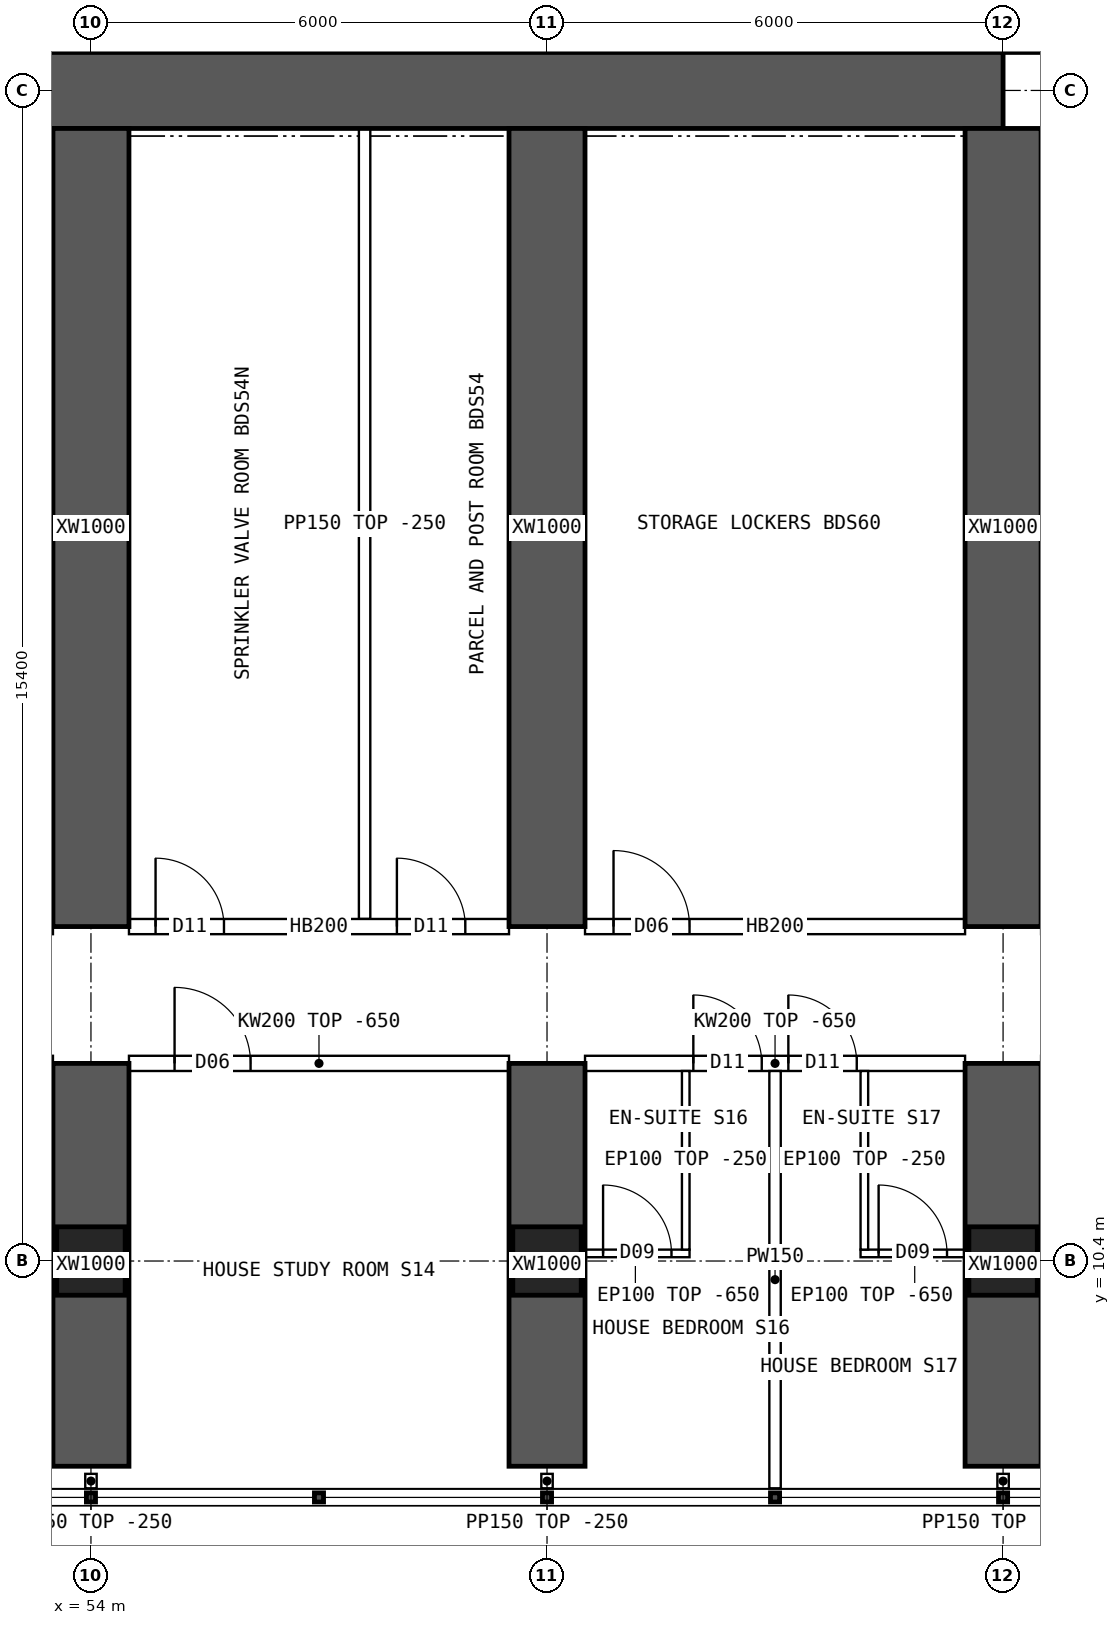
"""IFC4 building model, lengths in metres.
Left out: names, types, materials, properties, quantities, classifications, styles, units other than length and angle.
Written with IfcOpenShell. Run it as: python <this file> out.ifc"""

import sys

from ifc_helpers import new_model, si_unit, direction, frame, frame_2d, origin, origin_2d, place, context, subcontext, project, spatial, polyline, rectangle, hollow_rectangle, outline, extrude, element, fill, save


model = new_model("IFC4")
c1 = context("Model", 3, precision=1e-05, world=origin(), true_north=direction((0.0, 1.0)))
c2 = subcontext(c1, "Body", "Model", "MODEL_VIEW")
j1 = project(units=[si_unit("LENGTHUNIT", "METRE"), si_unit("PLANEANGLEUNIT", "RADIAN")], contexts=[c1])
p1 = place(None, origin())
s1 = spatial("IfcSite", under=j1, at=p1, CompositionType="ELEMENT")
p2 = place(p1, origin())
s2 = spatial("IfcBuilding", under=s1, at=p2, CompositionType="ELEMENT")
p3 = place(p2, frame((0.0, 0.0, 27.7)))
s3 = spatial("IfcBuildingStorey", under=s2, at=p3, CompositionType="ELEMENT", Elevation=27.7)
for number, where, z_axis, x_axis in (
    (1, (54.0, 10.4, 0.0), (0.0, 0.0, 1.0), (1.0, 0.0, 0.0)),
    (2, (60.0, 10.4, 0.0), (0.0, 0.0, 1.0), (1.0, 0.0, 0.0)),
    (3, (66.0, 10.4, 0.0), (0.0, 0.0, 1.0), (1.0, 0.0, 0.0)),
):
    element("IfcColumn", number, at=place(p3, frame(where, z_axis=z_axis, x_axis=x_axis)), inside=s3, PredefinedType="COLUMN", context=c2, shape_type="SweptSolid", body=[
        extrude(hollow_rectangle(XDim=0.9, YDim=0.9, WallThickness=0.09, at=origin_2d()), origin(), (0.0, 0.0, 1.0), 3.75),
    ])
p4 = place(p3, frame((18.0, 25.8, 0.0), z_axis=(0.0, 0.0, 1.0), x_axis=(1.0, 0.0, 0.0)))
e4 = element("IfcWall", 4, at=p4, inside=s3, PredefinedType="SHEAR", context=c2, shape_type="SweptSolid", body=[
    extrude(rectangle(XDim=48.0, YDim=1.0, at=frame_2d((24.0, 0.0))), origin(), (0.0, 0.0, 1.0), 3.75),
])
p5 = place(p3, frame((54.0, 7.7, 0.0), z_axis=(0.0, 0.0, 1.0), x_axis=(0.0, 1.0, 0.0)))
e5 = element("IfcWall", 5, at=p5, inside=s3, PredefinedType="SHEAR", context=c2, shape_type="SweptSolid", body=[
    extrude(rectangle(XDim=5.3, YDim=1.0, at=frame_2d((2.65, 0.0))), origin(), (0.0, 0.0, 1.0), 3.75),
])
p6 = place(p3, frame((54.0, 14.8, 0.0), z_axis=(0.0, 0.0, 1.0), x_axis=(0.0, 1.0, 0.0)))
e6 = element("IfcWall", 6, at=p6, inside=s3, PredefinedType="SHEAR", context=c2, shape_type="SweptSolid", body=[
    extrude(rectangle(XDim=10.5, YDim=1.0, at=frame_2d((5.25, 0.0))), origin(), (0.0, 0.0, 1.0), 3.75),
])
p7 = place(p3, frame((60.0, 7.7, 0.0), z_axis=(0.0, 0.0, 1.0), x_axis=(0.0, 1.0, 0.0)))
e7 = element("IfcWall", 7, at=p7, inside=s3, PredefinedType="SHEAR", context=c2, shape_type="SweptSolid", body=[
    extrude(rectangle(XDim=5.3, YDim=1.0, at=frame_2d((2.65, 0.0))), origin(), (0.0, 0.0, 1.0), 3.75),
])
p8 = place(p3, frame((60.0, 14.8, 0.0), z_axis=(0.0, 0.0, 1.0), x_axis=(0.0, 1.0, 0.0)))
e8 = element("IfcWall", 8, at=p8, inside=s3, PredefinedType="SHEAR", context=c2, shape_type="SweptSolid", body=[
    extrude(rectangle(XDim=10.5, YDim=1.0, at=frame_2d((5.25, 0.0))), origin(), (0.0, 0.0, 1.0), 3.75),
])
p9 = place(p3, frame((66.0, 7.7, 0.0), z_axis=(0.0, 0.0, 1.0), x_axis=(0.0, 1.0, 0.0)))
e9 = element("IfcWall", 9, at=p9, inside=s3, PredefinedType="SHEAR", context=c2, shape_type="SweptSolid", body=[
    extrude(rectangle(XDim=5.3, YDim=1.0, at=frame_2d((2.65, 0.0))), origin(), (0.0, 0.0, 1.0), 3.75),
])
p10 = place(p3, frame((66.0, 14.8, 0.0), z_axis=(0.0, 0.0, 1.0), x_axis=(0.0, 1.0, 0.0)))
e10 = element("IfcWall", 10, at=p10, inside=s3, PredefinedType="SHEAR", context=c2, shape_type="SweptSolid", body=[
    extrude(rectangle(XDim=10.5, YDim=1.0, at=frame_2d((5.25, 0.0))), origin(), (0.0, 0.0, 1.0), 3.75),
])
p11 = place(p3, frame((54.5, 13.0, 0.0), z_axis=(0.0, 0.0, 1.0), x_axis=(1.0, 0.0, 0.0)))
e11 = element("IfcWall", 11, at=p11, inside=s3, PredefinedType="SOLIDWALL", context=c2, shape_type="SweptSolid", body=[
    extrude(outline(polyline([(0.0, 0.0), (5.0, 0.0), (5.0, 3.1), (0.0, 3.1), (0.0, 0.0)])), frame((0.0, 0.1, 0.0), z_axis=(0.0, -1.0, 0.0), x_axis=(1.0, 0.0, 0.0)), (0.0, 0.0, 1.0), 0.2),
])
p12 = place(p11, frame((0.6, 0.0, 0.0)))
e12 = element("IfcOpeningElement", 12, at=p12, cuts=e11, PredefinedType="OPENING", context=c2, shape_type="SweptSolid", body=[
    extrude(rectangle(XDim=1.0, YDim=2.1, at=frame_2d((0.5, 1.05))), frame((0.0, 0.11, 0.0), z_axis=(0.0, -1.0, 0.0), x_axis=(1.0, 0.0, 0.0)), (0.0, 0.0, 1.0), 0.22),
])
p13 = place(p3, frame((54.5, 14.8, 0.0), z_axis=(0.0, 0.0, 1.0), x_axis=(1.0, 0.0, 0.0)))
e13 = element("IfcWall", 13, at=p13, inside=s3, PredefinedType="SOLIDWALL", context=c2, shape_type="SweptSolid", body=[
    extrude(rectangle(XDim=5.0, YDim=0.2, at=frame_2d((2.5, 0.0))), origin(), (0.0, 0.0, 1.0), 3.5),
])
p14 = place(p13, frame((0.35, 0.0, 0.0)))
e14 = element("IfcOpeningElement", 14, at=p14, cuts=e13, PredefinedType="OPENING", context=c2, shape_type="SweptSolid", body=[
    extrude(rectangle(XDim=0.9, YDim=2.1, at=frame_2d((0.45, 1.05))), frame((0.0, 0.11, 0.0), z_axis=(0.0, -1.0, 0.0), x_axis=(1.0, 0.0, 0.0)), (0.0, 0.0, 1.0), 0.22),
])
p15 = place(p13, frame((3.525, 0.0, 0.0)))
e15 = element("IfcOpeningElement", 15, at=p15, cuts=e13, PredefinedType="OPENING", context=c2, shape_type="SweptSolid", body=[
    extrude(rectangle(XDim=0.9, YDim=2.1, at=frame_2d((0.45, 1.05))), frame((0.0, 0.11, 0.0), z_axis=(0.0, -1.0, 0.0), x_axis=(1.0, 0.0, 0.0)), (0.0, 0.0, 1.0), 0.22),
])
p16 = place(p3, frame((60.5, 13.0, 0.0), z_axis=(0.0, 0.0, 1.0), x_axis=(1.0, 0.0, 0.0)))
e16 = element("IfcWall", 16, at=p16, inside=s3, PredefinedType="SOLIDWALL", context=c2, shape_type="SweptSolid", body=[
    extrude(outline(polyline([(0.0, 0.0), (5.0, 0.0), (5.0, 3.1), (0.0, 3.1), (0.0, 0.0)])), frame((0.0, 0.1, 0.0), z_axis=(0.0, -1.0, 0.0), x_axis=(1.0, 0.0, 0.0)), (0.0, 0.0, 1.0), 0.2),
])
p17 = place(p16, frame((1.425, 0.0, 0.0)))
e17 = element("IfcOpeningElement", 17, at=p17, cuts=e16, PredefinedType="OPENING", context=c2, shape_type="SweptSolid", body=[
    extrude(rectangle(XDim=0.9, YDim=2.1, at=frame_2d((0.45, 1.05))), frame((0.0, 0.11, 0.0), z_axis=(0.0, -1.0, 0.0), x_axis=(1.0, 0.0, 0.0)), (0.0, 0.0, 1.0), 0.22),
])
p18 = place(p16, frame((2.675, 0.0, 0.0)))
e18 = element("IfcOpeningElement", 18, at=p18, cuts=e16, PredefinedType="OPENING", context=c2, shape_type="SweptSolid", body=[
    extrude(rectangle(XDim=0.9, YDim=2.1, at=frame_2d((0.45, 1.05))), frame((0.0, 0.11, 0.0), z_axis=(0.0, -1.0, 0.0), x_axis=(1.0, 0.0, 0.0)), (0.0, 0.0, 1.0), 0.22),
])
p19 = place(p3, frame((60.5, 14.8, 0.0), z_axis=(0.0, 0.0, 1.0), x_axis=(1.0, 0.0, 0.0)))
e19 = element("IfcWall", 19, at=p19, inside=s3, PredefinedType="SOLIDWALL", context=c2, shape_type="SweptSolid", body=[
    extrude(rectangle(XDim=5.0, YDim=0.2, at=frame_2d((2.5, 0.0))), origin(), (0.0, 0.0, 1.0), 3.5),
])
p20 = place(p19, frame((0.375, 0.0, 0.0)))
e20 = element("IfcOpeningElement", 20, at=p20, cuts=e19, PredefinedType="OPENING", context=c2, shape_type="SweptSolid", body=[
    extrude(rectangle(XDim=1.0, YDim=2.1, at=frame_2d((0.5, 1.05))), frame((0.0, 0.11, 0.0), z_axis=(0.0, -1.0, 0.0), x_axis=(1.0, 0.0, 0.0)), (0.0, 0.0, 1.0), 0.22),
])
p21 = place(p3, frame((53.55, 10.5, 0.0), z_axis=(0.0, 0.0, 1.0), x_axis=(-1.0, 0.0, 0.0)))
e21 = element("IfcWall", 21, at=p21, inside=s3, PredefinedType="PARTITIONING", context=c2, shape_type="SweptSolid", body=[
    extrude(outline(polyline([(0.0, 0.0), (1.425, 0.0), (1.425, 3.1), (0.0, 3.1), (0.0, 0.0)])), frame((0.0, 0.05, 0.0), z_axis=(0.0, -1.0, 0.0), x_axis=(1.0, 0.0, 0.0)), (0.0, 0.0, 1.0), 0.1),
])
p22 = place(p21, frame((0.288, 0.0, 0.0)))
e22 = element("IfcOpeningElement", 22, at=p22, cuts=e21, PredefinedType="OPENING", context=c2, shape_type="SweptSolid", body=[
    extrude(rectangle(XDim=0.9, YDim=2.1, at=frame_2d((0.45, 1.05))), frame((0.0, 0.06, 0.0), z_axis=(0.0, -1.0, 0.0), x_axis=(1.0, 0.0, 0.0)), (0.0, 0.0, 1.0), 0.12),
])
p23 = place(p3, frame((63.0, 7.41, 0.0), z_axis=(0.0, 0.0, 1.0), x_axis=(0.0, 1.0, 0.0)))
e23 = element("IfcWall", 23, at=p23, inside=s3, PredefinedType="PARTITIONING", context=c2, shape_type="SweptSolid", body=[
    extrude(outline(polyline([(0.0, 0.0), (5.49, 0.0), (5.49, 3.1), (5.442, 3.1), (5.44, 3.5), (3.192, 3.5), (3.19, 3.1), (2.792, 3.1), (2.79, 3.5), (0.0, 3.5), (0.0, 0.0)])), frame((0.0, 0.075, 0.0), z_axis=(0.0, -1.0, 0.0), x_axis=(1.0, 0.0, 0.0)), (0.0, 0.0, 1.0), 0.15),
])
p24 = place(p3, frame((61.875, 10.5, 0.0), z_axis=(0.0, 0.0, 1.0), x_axis=(-1.0, 0.0, 0.0)))
e24 = element("IfcWall", 24, at=p24, inside=s3, PredefinedType="PARTITIONING", context=c2, shape_type="SweptSolid", body=[
    extrude(outline(polyline([(0.0, 0.0), (1.425, 0.0), (1.425, 3.1), (0.0, 3.1), (0.0, 0.0)])), frame((0.0, 0.05, 0.0), z_axis=(0.0, -1.0, 0.0), x_axis=(1.0, 0.0, 0.0)), (0.0, 0.0, 1.0), 0.1),
])
p25 = place(p24, frame((0.238, 0.0, 0.0)))
e25 = element("IfcOpeningElement", 25, at=p25, cuts=e24, PredefinedType="OPENING", context=c2, shape_type="SweptSolid", body=[
    extrude(rectangle(XDim=0.9, YDim=2.1, at=frame_2d((0.45, 1.05))), frame((0.0, 0.06, 0.0), z_axis=(0.0, -1.0, 0.0), x_axis=(1.0, 0.0, 0.0)), (0.0, 0.0, 1.0), 0.12),
])
p26 = place(p3, frame((61.825, 10.55, 0.0), z_axis=(0.0, 0.0, 1.0), x_axis=(0.0, 1.0, 0.0)))
e26 = element("IfcWall", 26, at=p26, inside=s3, PredefinedType="PARTITIONING", context=c2, shape_type="SweptSolid", body=[
    extrude(outline(polyline([(0.0, 0.0), (2.35, 0.0), (2.35, 3.1), (2.302, 3.1), (2.3, 3.5), (0.052, 3.5), (0.05, 3.1), (0.0, 3.1), (0.0, 0.0)])), frame((0.0, 0.05, 0.0), z_axis=(0.0, -1.0, 0.0), x_axis=(1.0, 0.0, 0.0)), (0.0, 0.0, 1.0), 0.1),
])
p27 = place(p3, frame((65.55, 10.5, 0.0), z_axis=(0.0, 0.0, 1.0), x_axis=(-1.0, 0.0, 0.0)))
e27 = element("IfcWall", 27, at=p27, inside=s3, PredefinedType="PARTITIONING", context=c2, shape_type="SweptSolid", body=[
    extrude(outline(polyline([(0.0, 0.0), (1.425, 0.0), (1.425, 3.1), (0.0, 3.1), (0.0, 0.0)])), frame((0.0, 0.05, 0.0), z_axis=(0.0, -1.0, 0.0), x_axis=(1.0, 0.0, 0.0)), (0.0, 0.0, 1.0), 0.1),
])
p28 = place(p27, frame((0.288, 0.0, 0.0)))
e28 = element("IfcOpeningElement", 28, at=p28, cuts=e27, PredefinedType="OPENING", context=c2, shape_type="SweptSolid", body=[
    extrude(rectangle(XDim=0.9, YDim=2.1, at=frame_2d((0.45, 1.05))), frame((0.0, 0.06, 0.0), z_axis=(0.0, -1.0, 0.0), x_axis=(1.0, 0.0, 0.0)), (0.0, 0.0, 1.0), 0.12),
])
p29 = place(p3, frame((64.175, 10.55, 0.0), z_axis=(0.0, 0.0, 1.0), x_axis=(0.0, 1.0, 0.0)))
e29 = element("IfcWall", 29, at=p29, inside=s3, PredefinedType="PARTITIONING", context=c2, shape_type="SweptSolid", body=[
    extrude(outline(polyline([(0.0, 0.0), (2.35, 0.0), (2.35, 3.1), (2.302, 3.1), (2.3, 3.5), (0.052, 3.5), (0.05, 3.1), (0.0, 3.1), (0.0, 0.0)])), frame((0.0, 0.05, 0.0), z_axis=(0.0, -1.0, 0.0), x_axis=(1.0, 0.0, 0.0)), (0.0, 0.0, 1.0), 0.1),
])
p30 = place(p3, frame((67.875, 10.5, 0.0), z_axis=(0.0, 0.0, 1.0), x_axis=(-1.0, 0.0, 0.0)))
e30 = element("IfcWall", 30, at=p30, inside=s3, PredefinedType="PARTITIONING", context=c2, shape_type="SweptSolid", body=[
    extrude(outline(polyline([(0.0, 0.0), (1.425, 0.0), (1.425, 3.1), (0.0, 3.1), (0.0, 0.0)])), frame((0.0, 0.05, 0.0), z_axis=(0.0, -1.0, 0.0), x_axis=(1.0, 0.0, 0.0)), (0.0, 0.0, 1.0), 0.1),
])
p31 = place(p30, frame((0.238, 0.0, 0.0)))
e31 = element("IfcOpeningElement", 31, at=p31, cuts=e30, PredefinedType="OPENING", context=c2, shape_type="SweptSolid", body=[
    extrude(rectangle(XDim=0.9, YDim=2.1, at=frame_2d((0.45, 1.05))), frame((0.0, 0.06, 0.0), z_axis=(0.0, -1.0, 0.0), x_axis=(1.0, 0.0, 0.0)), (0.0, 0.0, 1.0), 0.12),
])
p32 = place(p3, frame((57.6, 14.9, 0.0), z_axis=(0.0, 0.0, 1.0), x_axis=(0.0, 1.0, 0.0)))
e32 = element("IfcWall", 32, at=p32, inside=s3, PredefinedType="PARTITIONING", context=c2, shape_type="SweptSolid", body=[
    extrude(rectangle(XDim=10.4, YDim=0.15, at=frame_2d((5.2, 0.0))), origin(), (0.0, 0.0, 1.0), 3.5),
])
for number, where, z_axis, x_axis in (
    (33, (54.0, 7.6, 0.0), (0.0, 0.0, 1.0), (0.0, -1.0, 0.0)),
    (34, (60.0, 7.6, 0.0), (0.0, 0.0, 1.0), (0.0, -1.0, 0.0)),
    (35, (66.0, 7.6, 0.0), (0.0, 0.0, 1.0), (0.0, -1.0, 0.0)),
):
    element("IfcWall", number, at=place(p3, frame(where, z_axis=z_axis, x_axis=x_axis)), inside=s3, PredefinedType="PARTITIONING", context=c2, shape_type="SweptSolid", body=[
        extrude(rectangle(XDim=0.19, YDim=0.15, at=frame_2d((0.095, 0.0))), origin(), (0.0, 0.0, 1.0), 3.5),
    ])
p33 = place(p12, origin())
e36 = element("IfcDoor", 36, at=p33, inside=s3, OperationType="SINGLE_SWING_LEFT", PredefinedType="DOOR", context=c2, shape_type="SweptSolid", body=[
    extrude(rectangle(XDim=1.0, YDim=2.1, at=frame_2d((0.5, 1.05))), frame((0.0, 0.025, 0.0), z_axis=(0.0, -1.0, 0.0), x_axis=(1.0, 0.0, 0.0)), (0.0, 0.0, 1.0), 0.05),
])
fill(e12, e36)
p34 = place(p25, origin())
e37 = element("IfcDoor", 37, at=p34, inside=s3, OperationType="SINGLE_SWING_RIGHT", PredefinedType="DOOR", context=c2, shape_type="SweptSolid", body=[
    extrude(rectangle(XDim=0.9, YDim=2.1, at=frame_2d((0.45, 1.05))), frame((0.0, 0.025, 0.0), z_axis=(0.0, -1.0, 0.0), x_axis=(1.0, 0.0, 0.0)), (0.0, 0.0, 1.0), 0.05),
])
fill(e25, e37)
p35 = place(p17, origin())
e38 = element("IfcDoor", 38, at=p35, inside=s3, OperationType="SINGLE_SWING_LEFT", PredefinedType="DOOR", context=c2, shape_type="SweptSolid", body=[
    extrude(rectangle(XDim=0.9, YDim=2.1, at=frame_2d((0.45, 1.05))), frame((0.0, 0.025, 0.0), z_axis=(0.0, -1.0, 0.0), x_axis=(1.0, 0.0, 0.0)), (0.0, 0.0, 1.0), 0.05),
])
fill(e17, e38)
p36 = place(p28, origin())
e39 = element("IfcDoor", 39, at=p36, inside=s3, OperationType="SINGLE_SWING_RIGHT", PredefinedType="DOOR", context=c2, shape_type="SweptSolid", body=[
    extrude(rectangle(XDim=0.9, YDim=2.1, at=frame_2d((0.45, 1.05))), frame((0.0, 0.025, 0.0), z_axis=(0.0, -1.0, 0.0), x_axis=(1.0, 0.0, 0.0)), (0.0, 0.0, 1.0), 0.05),
])
fill(e28, e39)
p37 = place(p18, origin())
e40 = element("IfcDoor", 40, at=p37, inside=s3, OperationType="SINGLE_SWING_LEFT", PredefinedType="DOOR", context=c2, shape_type="SweptSolid", body=[
    extrude(rectangle(XDim=0.9, YDim=2.1, at=frame_2d((0.45, 1.05))), frame((0.0, 0.025, 0.0), z_axis=(0.0, -1.0, 0.0), x_axis=(1.0, 0.0, 0.0)), (0.0, 0.0, 1.0), 0.05),
])
fill(e18, e40)
p38 = place(p14, origin())
e41 = element("IfcDoor", 41, at=p38, inside=s3, OperationType="SINGLE_SWING_LEFT", PredefinedType="DOOR", context=c2, shape_type="SweptSolid", body=[
    extrude(rectangle(XDim=0.9, YDim=2.1, at=frame_2d((0.45, 1.05))), frame((0.0, 0.025, 0.0), z_axis=(0.0, -1.0, 0.0), x_axis=(1.0, 0.0, 0.0)), (0.0, 0.0, 1.0), 0.05),
])
fill(e14, e41)
p39 = place(p15, origin())
e42 = element("IfcDoor", 42, at=p39, inside=s3, OperationType="SINGLE_SWING_LEFT", PredefinedType="DOOR", context=c2, shape_type="SweptSolid", body=[
    extrude(rectangle(XDim=0.9, YDim=2.1, at=frame_2d((0.45, 1.05))), frame((0.0, 0.025, 0.0), z_axis=(0.0, -1.0, 0.0), x_axis=(1.0, 0.0, 0.0)), (0.0, 0.0, 1.0), 0.05),
])
fill(e15, e42)
p40 = place(p20, origin())
e43 = element("IfcDoor", 43, at=p40, inside=s3, OperationType="SINGLE_SWING_LEFT", PredefinedType="DOOR", context=c2, shape_type="SweptSolid", body=[
    extrude(rectangle(XDim=1.0, YDim=2.1, at=frame_2d((0.5, 1.05))), frame((0.0, 0.025, 0.0), z_axis=(0.0, -1.0, 0.0), x_axis=(1.0, 0.0, 0.0)), (0.0, 0.0, 1.0), 0.05),
])
fill(e20, e43)
save(model, sys.argv[1])
